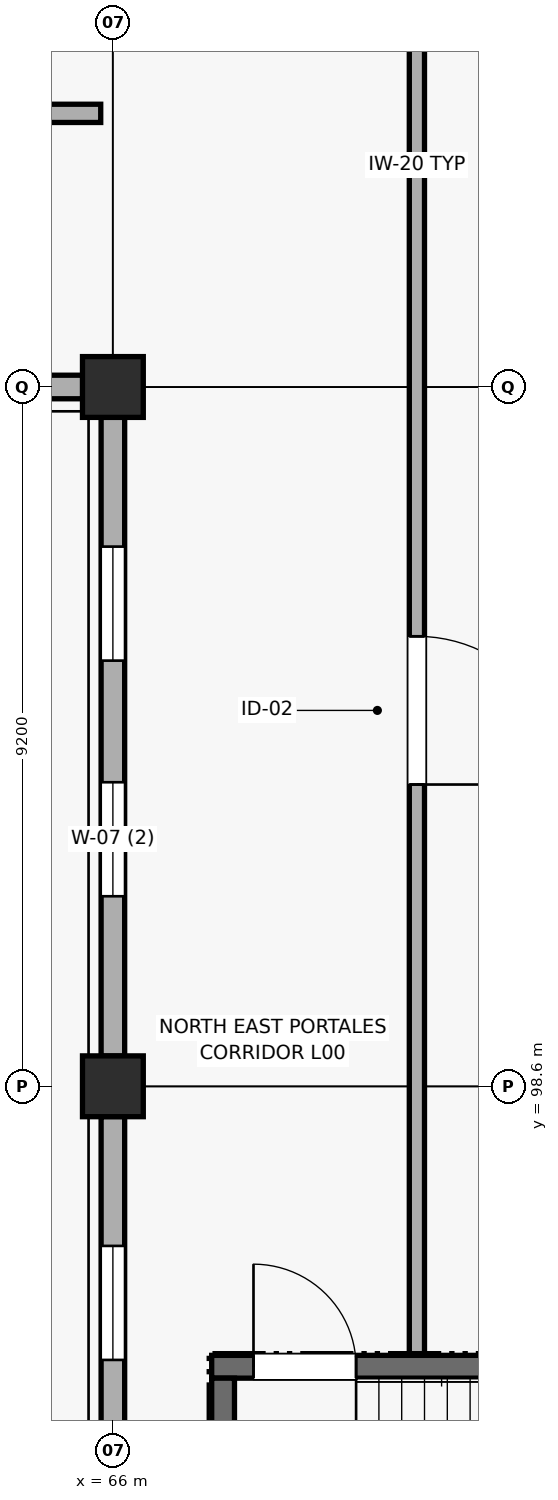
"""IFC4 building model, lengths in metres.
Left out: names, types, materials, properties, quantities, classifications, styles, units other than length and angle.
Written with IfcOpenShell. Run it as: python <this file> out.ifc"""

import sys

from ifc_helpers import new_model, si_unit, direction, frame, frame_2d, origin, origin_2d, place, context, subcontext, project, spatial, rectangle, extrude, element, fill, save


model = new_model("IFC4")
c1 = context("Model", 3, precision=1e-05, world=origin(), true_north=direction((0.0, 1.0)))
c2 = subcontext(c1, "Body", "Model", "MODEL_VIEW")
j1 = project(units=[si_unit("LENGTHUNIT", "METRE"), si_unit("PLANEANGLEUNIT", "RADIAN")], contexts=[c1])
p1 = place(None, origin())
s1 = spatial("IfcSite", under=j1, at=p1, CompositionType="ELEMENT")
p2 = place(p1, origin())
s2 = spatial("IfcBuilding", under=s1, at=p2, CompositionType="ELEMENT")
p3 = place(p2, origin())
s3 = spatial("IfcBuildingStorey", under=s2, at=p3, CompositionType="ELEMENT", Elevation=0.0)
for number, where, z_axis, x_axis in (
    (1, (66.0, 98.6, 0.0), (0.0, 0.0, 1.0), (1.0, 0.0, 0.0)),
    (2, (66.0, 107.8, 0.0), (0.0, 0.0, 1.0), (1.0, 0.0, 0.0)),
):
    element("IfcColumn", number, at=place(p3, frame(where, z_axis=z_axis, x_axis=x_axis)), inside=s3, PredefinedType="COLUMN", context=c2, shape_type="SweptSolid", body=[
        extrude(rectangle(XDim=0.8, YDim=0.8, at=origin_2d()), origin(), (0.0, 0.0, 1.0), 5.4),
    ])
p4 = place(p3, frame((55.016, 107.8, 0.0), z_axis=(0.0, 0.0, 1.0), x_axis=(1.0, 0.0, 0.0)))
e3 = element("IfcWall", 3, at=p4, inside=s3, PredefinedType="SOLIDWALL", context=c2, shape_type="SweptSolid", body=[
    extrude(rectangle(XDim=10.586, YDim=0.31, at=frame_2d((5.293, 0.0))), origin(), (0.0, 0.0, 1.0), 4.425),
])
p5 = place(p4, frame((2.684, 0.0, 0.95)))
e4 = element("IfcOpeningElement", 4, at=p5, cuts=e3, PredefinedType="OPENING", context=c2, shape_type="SweptSolid", body=[
    extrude(rectangle(XDim=1.65, YDim=2.25, at=frame_2d((0.825, 1.125))), frame((0.0, 0.165, 0.0), z_axis=(0.0, -1.0, 0.0), x_axis=(1.0, 0.0, 0.0)), (0.0, 0.0, 1.0), 0.33),
])
p6 = place(p4, frame((6.284, 0.0, 0.95)))
e5 = element("IfcOpeningElement", 5, at=p6, cuts=e3, PredefinedType="OPENING", context=c2, shape_type="SweptSolid", body=[
    extrude(rectangle(XDim=1.65, YDim=2.25, at=frame_2d((0.825, 1.125))), frame((0.0, 0.165, 0.0), z_axis=(0.0, -1.0, 0.0), x_axis=(1.0, 0.0, 0.0)), (0.0, 0.0, 1.0), 0.33),
])
p7 = place(p3, frame((66.0, 89.798, 0.0), z_axis=(0.0, 0.0, 1.0), x_axis=(0.0, 1.0, 0.0)))
e6 = element("IfcWall", 6, at=p7, inside=s3, PredefinedType="SOLIDWALL", context=c2, shape_type="SweptSolid", body=[
    extrude(rectangle(XDim=8.404, YDim=0.31, at=frame_2d((4.202, 0.0))), origin(), (0.0, 0.0, 1.0), 4.525),
])
p8 = place(p7, frame((2.102, 0.0, 0.95)))
e7 = element("IfcOpeningElement", 7, at=p8, cuts=e6, PredefinedType="OPENING", context=c2, shape_type="SweptSolid", body=[
    extrude(rectangle(XDim=1.5, YDim=2.25, at=frame_2d((0.75, 1.125))), frame((0.0, 0.165, 0.0), z_axis=(0.0, -1.0, 0.0), x_axis=(1.0, 0.0, 0.0)), (0.0, 0.0, 1.0), 0.33),
])
p9 = place(p7, frame((5.202, 0.0, 0.95)))
e8 = element("IfcOpeningElement", 8, at=p9, cuts=e6, PredefinedType="OPENING", context=c2, shape_type="SweptSolid", body=[
    extrude(rectangle(XDim=1.5, YDim=2.25, at=frame_2d((0.75, 1.125))), frame((0.0, 0.165, 0.0), z_axis=(0.0, -1.0, 0.0), x_axis=(1.0, 0.0, 0.0)), (0.0, 0.0, 1.0), 0.33),
])
p10 = place(p3, frame((66.0, 98.998, 0.0), z_axis=(0.0, 0.0, 1.0), x_axis=(0.0, 1.0, 0.0)))
e9 = element("IfcWall", 9, at=p10, inside=s3, PredefinedType="SOLIDWALL", context=c2, shape_type="SweptSolid", body=[
    extrude(rectangle(XDim=8.404, YDim=0.31, at=frame_2d((4.202, 0.0))), origin(), (0.0, 0.0, 1.0), 4.525),
])
p11 = place(p10, frame((2.102, 0.0, 0.95)))
e10 = element("IfcOpeningElement", 10, at=p11, cuts=e9, PredefinedType="OPENING", context=c2, shape_type="SweptSolid", body=[
    extrude(rectangle(XDim=1.5, YDim=2.25, at=frame_2d((0.75, 1.125))), frame((0.0, 0.165, 0.0), z_axis=(0.0, -1.0, 0.0), x_axis=(1.0, 0.0, 0.0)), (0.0, 0.0, 1.0), 0.33),
])
p12 = place(p10, frame((5.202, 0.0, 0.95)))
e11 = element("IfcOpeningElement", 11, at=p12, cuts=e9, PredefinedType="OPENING", context=c2, shape_type="SweptSolid", body=[
    extrude(rectangle(XDim=1.5, YDim=2.25, at=frame_2d((0.75, 1.125))), frame((0.0, 0.165, 0.0), z_axis=(0.0, -1.0, 0.0), x_axis=(1.0, 0.0, 0.0)), (0.0, 0.0, 1.0), 0.33),
])
p13 = place(p3, frame((75.95, 94.91, 0.0), z_axis=(0.0, 0.0, 1.0), x_axis=(-1.0, 0.0, 0.0)))
e12 = element("IfcWall", 12, at=p13, inside=s3, PredefinedType="SHEAR", context=c2, shape_type="SweptSolid", body=[
    extrude(rectangle(XDim=8.65, YDim=0.3, at=frame_2d((4.325, 0.0))), origin(), (0.0, 0.0, 1.0), 5.18),
])
p14 = place(p13, frame((6.75, 0.0, 0.0)))
e13 = element("IfcOpeningElement", 13, at=p14, cuts=e12, PredefinedType="OPENING", context=c2, shape_type="SweptSolid", body=[
    extrude(rectangle(XDim=1.35, YDim=2.2, at=frame_2d((0.675, 1.1))), frame((0.0, 0.16, 0.0), z_axis=(0.0, -1.0, 0.0), x_axis=(1.0, 0.0, 0.0)), (0.0, 0.0, 1.0), 0.32),
])
p15 = place(p3, frame((67.45, 94.76, 0.0), z_axis=(0.0, 0.0, 1.0), x_axis=(0.0, -1.0, 0.0)))
e14 = element("IfcWall", 14, at=p15, inside=s3, PredefinedType="SHEAR", context=c2, shape_type="SweptSolid", body=[
    extrude(rectangle(XDim=3.36, YDim=0.3, at=frame_2d((1.68, 0.0))), origin(), (0.0, 0.0, 1.0), 5.18),
])
p16 = place(p3, frame((22.16, 111.4, 0.0), z_axis=(0.0, 0.0, 1.0), x_axis=(1.0, 0.0, 0.0)))
e15 = element("IfcWall", 15, at=p16, inside=s3, PredefinedType="PARTITIONING", context=c2, shape_type="SweptSolid", body=[
    extrude(rectangle(XDim=43.68, YDim=0.24, at=frame_2d((21.84, 0.0))), origin(), (0.0, 0.0, 1.0), 4.525),
])
p17 = place(p16, frame((3.1, 0.0, 0.0)))
e16 = element("IfcOpeningElement", 16, at=p17, cuts=e15, PredefinedType="OPENING", context=c2, shape_type="SweptSolid", body=[
    extrude(rectangle(XDim=1.15, YDim=2.2, at=frame_2d((0.575, 1.1))), frame((0.0, 0.13, 0.0), z_axis=(0.0, -1.0, 0.0), x_axis=(1.0, 0.0, 0.0)), (0.0, 0.0, 1.0), 0.26),
])
p18 = place(p16, frame((15.2, 0.0, 0.0)))
e17 = element("IfcOpeningElement", 17, at=p18, cuts=e15, PredefinedType="OPENING", context=c2, shape_type="SweptSolid", body=[
    extrude(rectangle(XDim=1.85, YDim=2.4, at=frame_2d((0.925, 1.2))), frame((0.0, 0.13, 0.0), z_axis=(0.0, -1.0, 0.0), x_axis=(1.0, 0.0, 0.0)), (0.0, 0.0, 1.0), 0.26),
])
p19 = place(p16, frame((33.4, 0.0, 0.0)))
e18 = element("IfcOpeningElement", 18, at=p19, cuts=e15, PredefinedType="OPENING", context=c2, shape_type="SweptSolid", body=[
    extrude(rectangle(XDim=1.85, YDim=2.4, at=frame_2d((0.925, 1.2))), frame((0.0, 0.13, 0.0), z_axis=(0.0, -1.0, 0.0), x_axis=(1.0, 0.0, 0.0)), (0.0, 0.0, 1.0), 0.26),
])
p20 = place(p3, frame((70.0, 95.065, 0.0), z_axis=(0.0, 0.0, 1.0), x_axis=(0.0, 1.0, 0.0)))
e19 = element("IfcWall", 19, at=p20, inside=s3, PredefinedType="PARTITIONING", context=c2, shape_type="SweptSolid", body=[
    extrude(rectangle(XDim=21.74, YDim=0.2, at=frame_2d((10.87, 0.0))), origin(), (0.0, 0.0, 1.0), 4.425),
])
p21 = place(p20, frame((7.505, 0.0, 0.0)))
e20 = element("IfcOpeningElement", 20, at=p21, cuts=e19, PredefinedType="OPENING", context=c2, shape_type="SweptSolid", body=[
    extrude(rectangle(XDim=1.95, YDim=2.45, at=frame_2d((0.975, 1.225))), frame((0.0, 0.11, 0.0), z_axis=(0.0, -1.0, 0.0), x_axis=(1.0, 0.0, 0.0)), (0.0, 0.0, 1.0), 0.22),
])
p22 = place(p9, origin())
e21 = element("IfcWindow", 21, at=p22, inside=s3, PartitioningType="SINGLE_PANEL", PredefinedType="WINDOW", context=c2, shape_type="SweptSolid", body=[
    extrude(rectangle(XDim=1.5, YDim=2.25, at=frame_2d((0.75, 1.125))), frame((0.0, 0.03, 0.0), z_axis=(0.0, -1.0, 0.0), x_axis=(1.0, 0.0, 0.0)), (0.0, 0.0, 1.0), 0.06),
])
fill(e8, e21)
p23 = place(p11, origin())
e22 = element("IfcWindow", 22, at=p23, inside=s3, PartitioningType="SINGLE_PANEL", PredefinedType="WINDOW", context=c2, shape_type="SweptSolid", body=[
    extrude(rectangle(XDim=1.5, YDim=2.25, at=frame_2d((0.75, 1.125))), frame((0.0, 0.03, 0.0), z_axis=(0.0, -1.0, 0.0), x_axis=(1.0, 0.0, 0.0)), (0.0, 0.0, 1.0), 0.06),
])
fill(e10, e22)
p24 = place(p12, origin())
e23 = element("IfcWindow", 23, at=p24, inside=s3, PartitioningType="SINGLE_PANEL", PredefinedType="WINDOW", context=c2, shape_type="SweptSolid", body=[
    extrude(rectangle(XDim=1.5, YDim=2.25, at=frame_2d((0.75, 1.125))), frame((0.0, 0.03, 0.0), z_axis=(0.0, -1.0, 0.0), x_axis=(1.0, 0.0, 0.0)), (0.0, 0.0, 1.0), 0.06),
])
fill(e11, e23)
p25 = place(p14, frame((1.35, 0.0, 0.0), z_axis=(0.0, 0.0, 1.0), x_axis=(-1.0, 0.0, 0.0)))
e24 = element("IfcDoor", 24, at=p25, inside=s3, OperationType="SINGLE_SWING_LEFT", PredefinedType="DOOR", context=c2, shape_type="SweptSolid", body=[
    extrude(rectangle(XDim=1.35, YDim=2.2, at=frame_2d((0.675, 1.1))), frame((0.0, 0.025, 0.0), z_axis=(0.0, -1.0, 0.0), x_axis=(1.0, 0.0, 0.0)), (0.0, 0.0, 1.0), 0.05),
])
fill(e13, e24)
p26 = place(p21, frame((1.95, 0.0, 0.0), z_axis=(0.0, 0.0, 1.0), x_axis=(-1.0, 0.0, 0.0)))
e25 = element("IfcDoor", 25, at=p26, inside=s3, OperationType="SINGLE_SWING_RIGHT", PredefinedType="DOOR", context=c2, shape_type="SweptSolid", body=[
    extrude(rectangle(XDim=1.95, YDim=2.45, at=frame_2d((0.975, 1.225))), frame((0.0, 0.025, 0.0), z_axis=(0.0, -1.0, 0.0), x_axis=(1.0, 0.0, 0.0)), (0.0, 0.0, 1.0), 0.05),
])
fill(e20, e25)
save(model, sys.argv[1])
